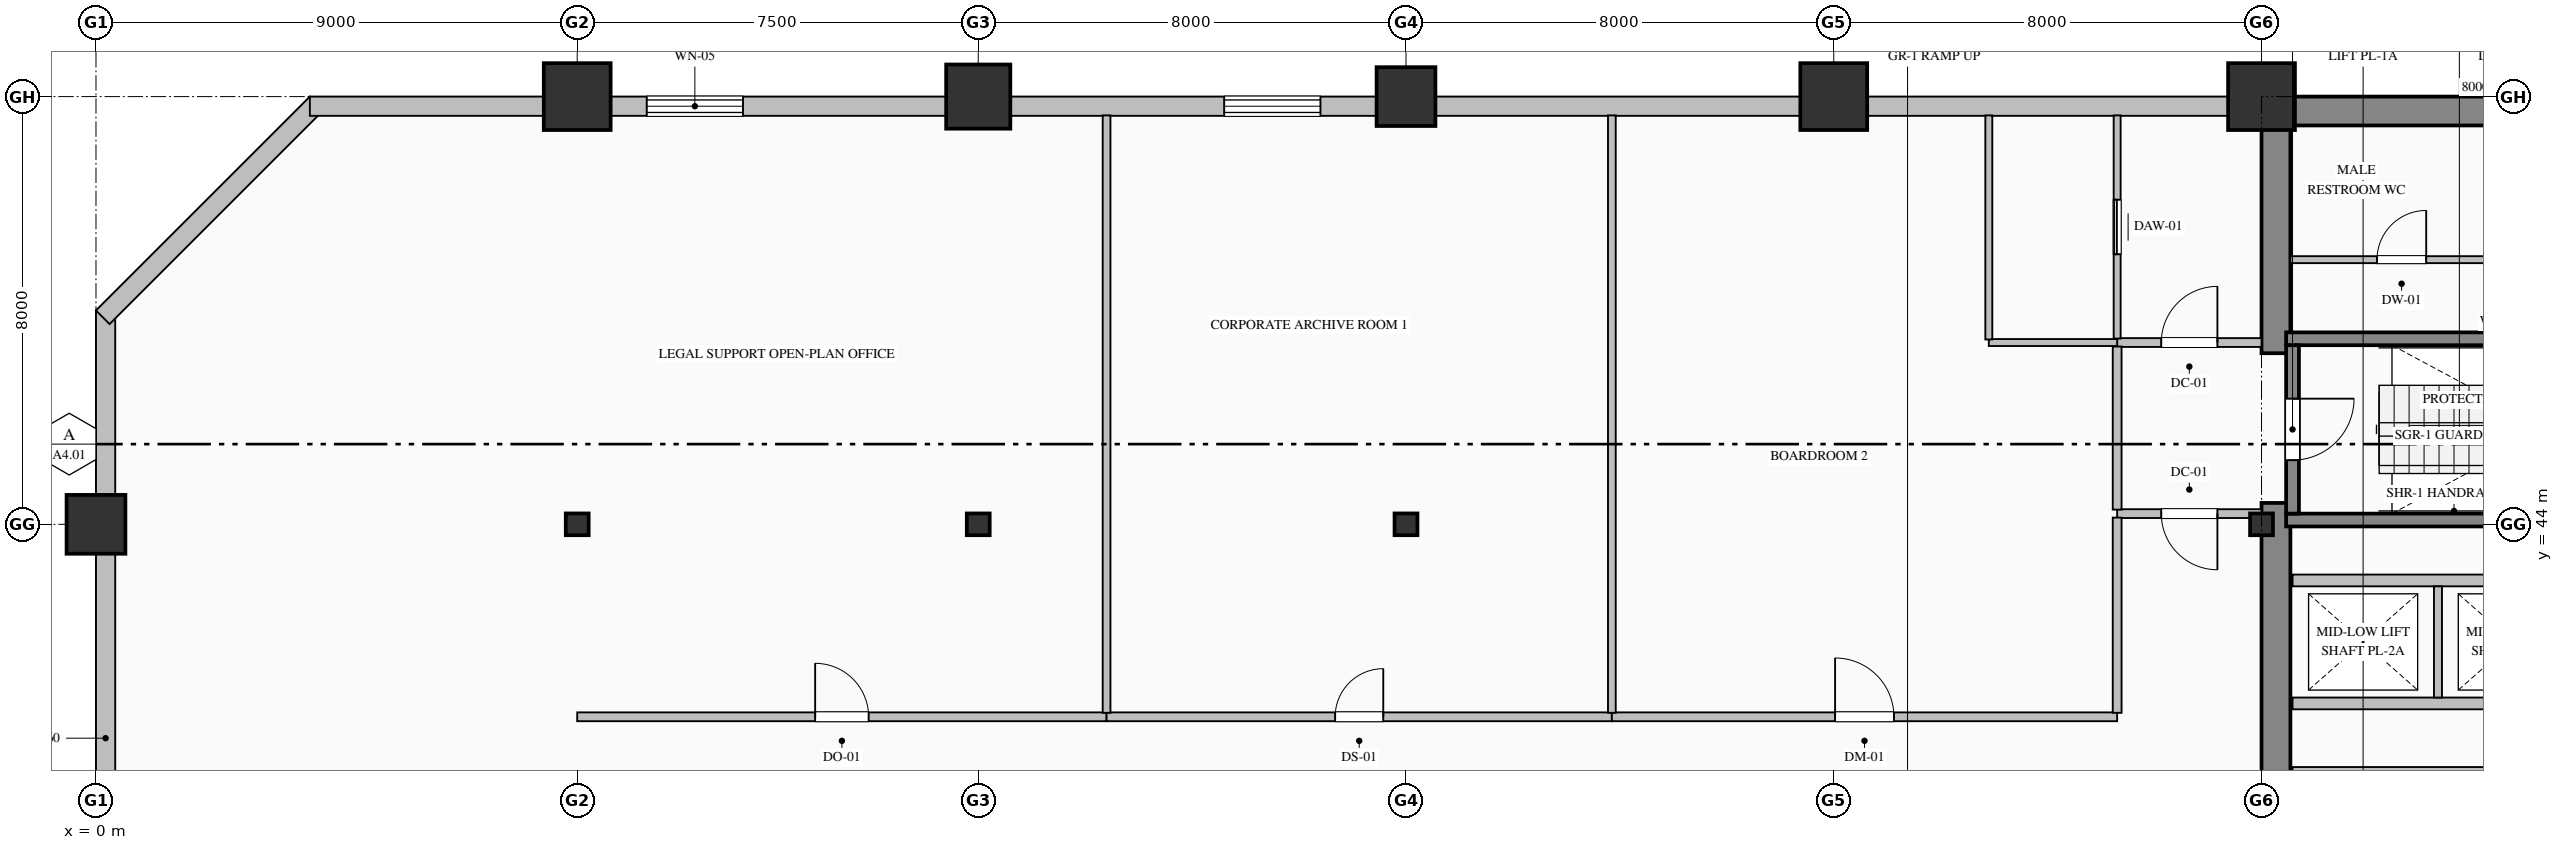
"""IFC4 building model, lengths in metres.
Left out: names, types, materials, properties, quantities, classifications, styles, units other than length and angle.
Written with IfcOpenShell. Run it as: python <this file> out.ifc"""

import sys

from ifc_helpers import new_model, si_unit, direction, frame, frame_2d, origin, origin_2d, place, context, subcontext, project, spatial, rectangle, hollow_rectangle, hollow_circle, i_section, extrude, element, fill, save


model = new_model("IFC4")
c1 = context("Model", 3, precision=1e-05, world=origin(), true_north=direction((0.0, 1.0)))
c2 = subcontext(c1, "Body", "Model", "MODEL_VIEW")
j1 = project(units=[si_unit("LENGTHUNIT", "METRE"), si_unit("PLANEANGLEUNIT", "RADIAN")], contexts=[c1])
p1 = place(None, origin())
s1 = spatial("IfcSite", under=j1, at=p1, CompositionType="ELEMENT")
p2 = place(p1, origin())
s2 = spatial("IfcBuilding", under=s1, at=p2, CompositionType="ELEMENT")
p3 = place(p2, frame((0.0, 0.0, 100.2)))
s3 = spatial("IfcBuildingStorey", under=s2, at=p3, CompositionType="ELEMENT", Elevation=100.2)
p4 = place(p3, frame((40.5, 51.73, 0.0), z_axis=(0.0, 0.0, 1.0), x_axis=(1.0, 0.0, 0.0)))
e1 = element("IfcWall", 1, at=p4, inside=s3, PredefinedType="SHEAR", context=c2, shape_type="SweptSolid", body=[
    extrude(rectangle(XDim=23.5, YDim=0.54, at=frame_2d((11.75, 0.0))), origin(), (0.0, 0.0, 1.0), 3.75),
])
p5 = place(p3, frame((40.77, 36.54, 0.0), z_axis=(0.0, 0.0, 1.0), x_axis=(0.0, 1.0, 0.0)))
e2 = element("IfcWall", 2, at=p5, inside=s3, PredefinedType="SHEAR", context=c2, shape_type="SweptSolid", body=[
    extrude(rectangle(XDim=7.86, YDim=0.54, at=frame_2d((3.93, 0.0))), origin(), (0.0, 0.0, 1.0), 3.75),
])
p6 = place(p3, frame((40.77, 47.2, 0.0), z_axis=(0.0, 0.0, 1.0), x_axis=(0.0, 1.0, 0.0)))
e3 = element("IfcWall", 3, at=p6, inside=s3, PredefinedType="SHEAR", context=c2, shape_type="SweptSolid", body=[
    extrude(rectangle(XDim=4.26, YDim=0.54, at=frame_2d((2.13, 0.0))), origin(), (0.0, 0.0, 1.0), 3.75),
])
p7 = place(p3, frame((0.0, 44.0, 0.0), z_axis=(0.0, 0.0, 1.0), x_axis=(1.0, 0.0, 0.0)))
e4 = element("IfcColumn", 4, at=p7, inside=s3, PredefinedType="COLUMN", context=c2, shape_type="SweptSolid", body=[
    extrude(hollow_rectangle(XDim=1.1, YDim=1.1, WallThickness=0.04, at=origin_2d()), origin(), (0.0, 0.0, 1.0), 4.0),
])
p8 = place(p3, frame((9.0, 44.0, 0.0), z_axis=(0.0, 0.0, 1.0), x_axis=(1.0, 0.0, 0.0)))
e5 = element("IfcColumn", 5, at=p8, inside=s3, PredefinedType="COLUMN", context=c2, shape_type="SweptSolid", body=[
    extrude(i_section(OverallWidth=0.407, OverallDepth=0.428, WebThickness=0.02, FlangeThickness=0.035, FilletRadius=0.022, at=origin_2d()), origin(), (0.0, 0.0, 1.0), 4.0),
])
p9 = place(p3, frame((9.0, 52.0, 0.0), z_axis=(0.0, 0.0, 1.0), x_axis=(1.0, 0.0, 0.0)))
e6 = element("IfcColumn", 6, at=p9, inside=s3, PredefinedType="COLUMN", context=c2, shape_type="SweptSolid", body=[
    extrude(hollow_rectangle(XDim=1.25, YDim=1.25, WallThickness=0.045, at=origin_2d()), origin(), (0.0, 0.0, 1.0), 4.0),
])
p10 = place(p3, frame((16.5, 44.0, 0.0), z_axis=(0.0, 0.0, 1.0), x_axis=(1.0, 0.0, 0.0)))
e7 = element("IfcColumn", 7, at=p10, inside=s3, PredefinedType="COLUMN", context=c2, shape_type="SweptSolid", body=[
    extrude(i_section(OverallWidth=0.407, OverallDepth=0.428, WebThickness=0.02, FlangeThickness=0.035, FilletRadius=0.022, at=origin_2d()), origin(), (0.0, 0.0, 1.0), 4.0),
])
p11 = place(p3, frame((16.5, 52.0, 0.0), z_axis=(0.0, 0.0, 1.0), x_axis=(1.0, 0.0, 0.0)))
e8 = element("IfcColumn", 8, at=p11, inside=s3, PredefinedType="COLUMN", context=c2, shape_type="SweptSolid", body=[
    extrude(hollow_circle(Radius=0.6, WallThickness=0.04, at=origin_2d()), origin(), (0.0, 0.0, 1.0), 4.0),
])
p12 = place(p3, frame((24.5, 44.0, 0.0), z_axis=(0.0, 0.0, 1.0), x_axis=(1.0, 0.0, 0.0)))
e9 = element("IfcColumn", 9, at=p12, inside=s3, PredefinedType="COLUMN", context=c2, shape_type="SweptSolid", body=[
    extrude(i_section(OverallWidth=0.407, OverallDepth=0.428, WebThickness=0.02, FlangeThickness=0.035, FilletRadius=0.022, at=origin_2d()), origin(), (0.0, 0.0, 1.0), 4.0),
])
p13 = place(p3, frame((24.5, 52.0, 0.0), z_axis=(0.0, 0.0, 1.0), x_axis=(1.0, 0.0, 0.0)))
e10 = element("IfcColumn", 10, at=p13, inside=s3, PredefinedType="COLUMN", context=c2, shape_type="SweptSolid", body=[
    extrude(hollow_rectangle(XDim=1.1, YDim=1.1, WallThickness=0.04, at=origin_2d()), origin(), (0.0, 0.0, 1.0), 4.0),
])
p14 = place(p3, frame((32.5, 52.0, 0.0), z_axis=(0.0, 0.0, 1.0), x_axis=(1.0, 0.0, 0.0)))
e11 = element("IfcColumn", 11, at=p14, inside=s3, PredefinedType="COLUMN", context=c2, shape_type="SweptSolid", body=[
    extrude(hollow_rectangle(XDim=1.25, YDim=1.25, WallThickness=0.045, at=origin_2d()), origin(), (0.0, 0.0, 1.0), 4.0),
])
p15 = place(p3, frame((40.5, 44.0, 0.0), z_axis=(0.0, 0.0, 1.0), x_axis=(1.0, 0.0, 0.0)))
e12 = element("IfcColumn", 12, at=p15, inside=s3, PredefinedType="COLUMN", context=c2, shape_type="SweptSolid", body=[
    extrude(i_section(OverallWidth=0.407, OverallDepth=0.428, WebThickness=0.02, FlangeThickness=0.035, FilletRadius=0.022, at=origin_2d()), origin(), (0.0, 0.0, 1.0), 4.0),
])
p16 = place(p3, frame((40.5, 52.0, 0.0), z_axis=(0.0, 0.0, 1.0), x_axis=(1.0, 0.0, 0.0)))
e13 = element("IfcColumn", 13, at=p16, inside=s3, PredefinedType="COLUMN", context=c2, shape_type="SweptSolid", body=[
    extrude(hollow_rectangle(XDim=1.25, YDim=1.25, WallThickness=0.045, at=origin_2d()), origin(), (0.0, 0.0, 1.0), 4.0),
])
p17 = place(p3, frame((0.18, 32.0, 0.0), z_axis=(0.0, 0.0, 1.0), x_axis=(0.0, 1.0, 0.0)))
e14 = element("IfcWall", 14, at=p17, inside=s3, PredefinedType="SOLIDWALL", context=c2, shape_type="SweptSolid", body=[
    extrude(rectangle(XDim=16.0, YDim=0.36, at=frame_2d((8.0, 0.0))), origin(), (0.0, 0.0, 1.0), 3.25),
])
p18 = place(p3, frame((0.127, 47.873, 0.0), z_axis=(0.0, 0.0, 1.0), x_axis=(0.707106781187, 0.707106781187, 0.0)))
e15 = element("IfcWall", 15, at=p18, inside=s3, PredefinedType="SOLIDWALL", context=c2, shape_type="SweptSolid", body=[
    extrude(rectangle(XDim=5.657, YDim=0.36, at=frame_2d((2.828, 0.0))), origin(), (0.0, 0.0, 1.0), 3.75),
])
p19 = place(p3, frame((4.0, 51.82, 0.0), z_axis=(0.0, 0.0, 1.0), x_axis=(1.0, 0.0, 0.0)))
e16 = element("IfcWall", 16, at=p19, inside=s3, PredefinedType="SOLIDWALL", context=c2, shape_type="SweptSolid", body=[
    extrude(rectangle(XDim=36.52, YDim=0.36, at=frame_2d((18.26, 0.0))), origin(), (0.0, 0.0, 1.0), 3.25),
])
p20 = place(p19, frame((6.3, 0.0, 0.85)))
e17 = element("IfcOpeningElement", 17, at=p20, cuts=e16, PredefinedType="OPENING", context=c2, shape_type="SweptSolid", body=[
    extrude(rectangle(XDim=1.8, YDim=2.05, at=frame_2d((0.9, 1.025))), frame((0.0, 0.19, 0.0), z_axis=(0.0, -1.0, 0.0), x_axis=(1.0, 0.0, 0.0)), (0.0, 0.0, 1.0), 0.38),
])
p21 = place(p19, frame((17.1, 0.0, 0.85)))
e18 = element("IfcOpeningElement", 18, at=p21, cuts=e16, PredefinedType="OPENING", context=c2, shape_type="SweptSolid", body=[
    extrude(rectangle(XDim=1.8, YDim=2.05, at=frame_2d((0.9, 1.025))), frame((0.0, 0.19, 0.0), z_axis=(0.0, -1.0, 0.0), x_axis=(1.0, 0.0, 0.0)), (0.0, 0.0, 1.0), 0.38),
])
for number, where, z_axis, x_axis in (
    (19, (40.96, 47.47, 0.0), (0.0, 0.0, 1.0), (1.0, 0.0, 0.0)),
    (20, (49.04, 44.08, 0.0), (0.0, 0.0, 1.0), (-1.0, 0.0, 0.0)),
):
    element("IfcWall", number, at=place(p3, frame(where, z_axis=z_axis, x_axis=x_axis)), inside=s3, PredefinedType="SOLIDWALL", context=c2, shape_type="SweptSolid", body=[
        extrude(rectangle(XDim=8.08, YDim=0.24, at=frame_2d((4.04, 0.0))), origin(), (0.0, 0.0, 1.0), 4.0),
    ])
p22 = place(p3, frame((41.08, 47.35, 0.0), z_axis=(0.0, 0.0, 1.0), x_axis=(0.0, -1.0, 0.0)))
e21 = element("IfcWall", 21, at=p22, inside=s3, PredefinedType="SOLIDWALL", context=c2, shape_type="SweptSolid", body=[
    extrude(rectangle(XDim=3.15, YDim=0.24, at=frame_2d((1.575, 0.0))), origin(), (0.0, 0.0, 1.0), 4.0),
])
p23 = place(p22, frame((1.0, 0.0, 0.0)))
e22 = element("IfcOpeningElement", 22, at=p23, cuts=e21, PredefinedType="OPENING", context=c2, shape_type="SweptSolid", body=[
    extrude(rectangle(XDim=1.15, YDim=2.2, at=frame_2d((0.575, 1.1))), frame((0.0, 0.13, 0.0), z_axis=(0.0, -1.0, 0.0), x_axis=(1.0, 0.0, 0.0)), (0.0, 0.0, 1.0), 0.26),
])
for number, where, z_axis, x_axis in (
    (23, (41.08, 39.35, 0.0), (0.0, 0.0, 1.0), (1.0, 0.0, 0.0)),
    (24, (49.32, 40.65, 0.0), (0.0, 0.0, 1.0), (-1.0, 0.0, 0.0)),
    (25, (41.08, 42.95, 0.0), (0.0, 0.0, 1.0), (1.0, 0.0, 0.0)),
):
    element("IfcWall", number, at=place(p3, frame(where, z_axis=z_axis, x_axis=x_axis)), inside=s3, PredefinedType="PARTITIONING", context=c2, shape_type="SweptSolid", body=[
        extrude(rectangle(XDim=8.24, YDim=0.22, at=frame_2d((4.12, 0.0))), origin(), (0.0, 0.0, 1.0), 3.75),
    ])
p24 = place(p3, frame((43.8, 40.76, 0.0), z_axis=(0.0, 0.0, 1.0), x_axis=(0.0, 1.0, 0.0)))
e26 = element("IfcWall", 26, at=p24, inside=s3, PredefinedType="PARTITIONING", context=c2, shape_type="SweptSolid", body=[
    extrude(rectangle(XDim=2.08, YDim=0.15, at=frame_2d((1.04, 0.0))), origin(), (0.0, 0.0, 1.0), 3.75),
])
p25 = place(p3, frame((37.8, 47.4, 0.0), z_axis=(0.0, 0.0, 1.0), x_axis=(1.0, 0.0, 0.0)))
e27 = element("IfcWall", 27, at=p25, inside=s3, PredefinedType="PARTITIONING", context=c2, shape_type="SweptSolid", body=[
    extrude(rectangle(XDim=2.7, YDim=0.165, at=frame_2d((1.35, 0.0))), origin(), (0.0, 0.0, 1.0), 3.75),
])
p26 = place(p25, frame((0.825, 0.0, 0.0)))
e28 = element("IfcOpeningElement", 28, at=p26, cuts=e27, PredefinedType="OPENING", context=c2, shape_type="SweptSolid", body=[
    extrude(rectangle(XDim=1.05, YDim=2.15, at=frame_2d((0.525, 1.075))), frame((0.0, 0.093, 0.0), z_axis=(0.0, -1.0, 0.0), x_axis=(1.0, 0.0, 0.0)), (0.0, 0.0, 1.0), 0.185),
])
p27 = place(p3, frame((40.5, 44.2, 0.0), z_axis=(0.0, 0.0, 1.0), x_axis=(-1.0, 0.0, 0.0)))
e29 = element("IfcWall", 29, at=p27, inside=s3, PredefinedType="PARTITIONING", context=c2, shape_type="SweptSolid", body=[
    extrude(rectangle(XDim=2.7, YDim=0.165, at=frame_2d((1.35, 0.0))), origin(), (0.0, 0.0, 1.0), 3.75),
])
p28 = place(p27, frame((0.825, 0.0, 0.0)))
e30 = element("IfcOpeningElement", 30, at=p28, cuts=e29, PredefinedType="OPENING", context=c2, shape_type="SweptSolid", body=[
    extrude(rectangle(XDim=1.05, YDim=2.15, at=frame_2d((0.525, 1.075))), frame((0.0, 0.093, 0.0), z_axis=(0.0, -1.0, 0.0), x_axis=(1.0, 0.0, 0.0)), (0.0, 0.0, 1.0), 0.185),
])
p29 = place(p3, frame((37.8, 44.274, 0.0), z_axis=(0.0, 0.0, 1.0), x_axis=(0.0, 1.0, 0.0)))
e31 = element("IfcWall", 31, at=p29, inside=s3, PredefinedType="PARTITIONING", context=c2, shape_type="SweptSolid", body=[
    extrude(rectangle(XDim=3.051, YDim=0.165, at=frame_2d((1.525, 0.0))), origin(), (0.0, 0.0, 1.0), 3.75),
])
p30 = place(p3, frame((37.8, 47.475, 0.0), z_axis=(0.0, 0.0, 1.0), x_axis=(0.0, 1.0, 0.0)))
e32 = element("IfcWall", 32, at=p30, inside=s3, PredefinedType="PARTITIONING", context=c2, shape_type="SweptSolid", body=[
    extrude(rectangle(XDim=4.173, YDim=0.13, at=frame_2d((2.087, 0.0))), origin(), (0.0, 0.0, 1.0), 3.75),
])
p31 = place(p30, frame((1.577, 0.0, 0.0)))
e33 = element("IfcOpeningElement", 33, at=p31, cuts=e32, PredefinedType="OPENING", context=c2, shape_type="SweptSolid", body=[
    extrude(rectangle(XDim=1.02, YDim=2.15, at=frame_2d((0.51, 1.075))), frame((0.0, 0.075, 0.0), z_axis=(0.0, -1.0, 0.0), x_axis=(1.0, 0.0, 0.0)), (0.0, 0.0, 1.0), 0.15),
])
p32 = place(p3, frame((37.8, 47.4, 0.0), z_axis=(0.0, 0.0, 1.0), x_axis=(-1.0, 0.0, 0.0)))
e34 = element("IfcWall", 34, at=p32, inside=s3, PredefinedType="PARTITIONING", context=c2, shape_type="SweptSolid", body=[
    extrude(rectangle(XDim=2.4, YDim=0.13, at=frame_2d((1.2, 0.0))), origin(), (0.0, 0.0, 1.0), 3.75),
])
p33 = place(p3, frame((35.4, 47.457, 0.0), z_axis=(0.0, 0.0, 1.0), x_axis=(0.0, 1.0, 0.0)))
e35 = element("IfcWall", 35, at=p33, inside=s3, PredefinedType="PARTITIONING", context=c2, shape_type="SweptSolid", body=[
    extrude(rectangle(XDim=4.191, YDim=0.13, at=frame_2d((2.095, 0.0))), origin(), (0.0, 0.0, 1.0), 3.75),
])
p34 = place(p3, frame((41.04, 48.95, 0.0), z_axis=(0.0, 0.0, 1.0), x_axis=(1.0, 0.0, 0.0)))
e36 = element("IfcWall", 36, at=p34, inside=s3, PredefinedType="PARTITIONING", context=c2, shape_type="SweptSolid", body=[
    extrude(rectangle(XDim=4.16, YDim=0.13, at=frame_2d((2.08, 0.0))), origin(), (0.0, 0.0, 1.0), 3.75),
])
p35 = place(p34, frame((1.62, 0.0, 0.0)))
e37 = element("IfcOpeningElement", 37, at=p35, cuts=e36, PredefinedType="OPENING", context=c2, shape_type="SweptSolid", body=[
    extrude(rectangle(XDim=0.92, YDim=2.15, at=frame_2d((0.46, 1.075))), frame((0.0, 0.075, 0.0), z_axis=(0.0, -1.0, 0.0), x_axis=(1.0, 0.0, 0.0)), (0.0, 0.0, 1.0), 0.15),
])
p36 = place(p3, frame((9.0, 40.4, 0.0), z_axis=(0.0, 0.0, 1.0), x_axis=(1.0, 0.0, 0.0)))
e38 = element("IfcWall", 38, at=p36, inside=s3, PredefinedType="PARTITIONING", context=c2, shape_type="SweptSolid", body=[
    extrude(rectangle(XDim=9.9, YDim=0.165, at=frame_2d((4.95, 0.0))), origin(), (0.0, 0.0, 1.0), 3.75),
])
p37 = place(p36, frame((4.45, 0.0, 0.0)))
e39 = element("IfcOpeningElement", 39, at=p37, cuts=e38, PredefinedType="OPENING", context=c2, shape_type="SweptSolid", body=[
    extrude(rectangle(XDim=1.0, YDim=2.15, at=frame_2d((0.5, 1.075))), frame((0.0, 0.093, 0.0), z_axis=(0.0, -1.0, 0.0), x_axis=(1.0, 0.0, 0.0)), (0.0, 0.0, 1.0), 0.185),
])
p38 = place(p3, frame((18.9, 40.4, 0.0), z_axis=(0.0, 0.0, 1.0), x_axis=(1.0, 0.0, 0.0)))
e40 = element("IfcWall", 40, at=p38, inside=s3, PredefinedType="PARTITIONING", context=c2, shape_type="SweptSolid", body=[
    extrude(rectangle(XDim=9.45, YDim=0.165, at=frame_2d((4.725, 0.0))), origin(), (0.0, 0.0, 1.0), 3.75),
])
p39 = place(p38, frame((4.275, 0.0, 0.0)))
e41 = element("IfcOpeningElement", 41, at=p39, cuts=e40, PredefinedType="OPENING", context=c2, shape_type="SweptSolid", body=[
    extrude(rectangle(XDim=0.9, YDim=2.15, at=frame_2d((0.45, 1.075))), frame((0.0, 0.093, 0.0), z_axis=(0.0, -1.0, 0.0), x_axis=(1.0, 0.0, 0.0)), (0.0, 0.0, 1.0), 0.185),
])
p40 = place(p3, frame((28.35, 40.4, 0.0), z_axis=(0.0, 0.0, 1.0), x_axis=(1.0, 0.0, 0.0)))
e42 = element("IfcWall", 42, at=p40, inside=s3, PredefinedType="PARTITIONING", context=c2, shape_type="SweptSolid", body=[
    extrude(rectangle(XDim=9.45, YDim=0.165, at=frame_2d((4.725, 0.0))), origin(), (0.0, 0.0, 1.0), 3.75),
])
p41 = place(p40, frame((4.175, 0.0, 0.0)))
e43 = element("IfcOpeningElement", 43, at=p41, cuts=e42, PredefinedType="OPENING", context=c2, shape_type="SweptSolid", body=[
    extrude(rectangle(XDim=1.1, YDim=2.2, at=frame_2d((0.55, 1.1))), frame((0.0, 0.093, 0.0), z_axis=(0.0, -1.0, 0.0), x_axis=(1.0, 0.0, 0.0)), (0.0, 0.0, 1.0), 0.185),
])
p42 = place(p3, frame((37.8, 40.475, 0.0), z_axis=(0.0, 0.0, 1.0), x_axis=(0.0, 1.0, 0.0)))
e44 = element("IfcWall", 44, at=p42, inside=s3, PredefinedType="PARTITIONING", context=c2, shape_type="SweptSolid", body=[
    extrude(rectangle(XDim=3.651, YDim=0.165, at=frame_2d((1.825, 0.0))), origin(), (0.0, 0.0, 1.0), 3.75),
])
for number, where, z_axis, x_axis in (
    (45, (18.9, 51.648, 0.0), (0.0, 0.0, 1.0), (0.0, -1.0, 0.0)),
    (46, (28.35, 51.648, 0.0), (0.0, 0.0, 1.0), (0.0, -1.0, 0.0)),
):
    element("IfcWall", number, at=place(p3, frame(where, z_axis=z_axis, x_axis=x_axis)), inside=s3, PredefinedType="PARTITIONING", context=c2, shape_type="SweptSolid", body=[
        extrude(rectangle(XDim=11.173, YDim=0.145, at=frame_2d((5.587, 0.0))), origin(), (0.0, 0.0, 1.0), 3.75),
    ])
p43 = place(p20, origin())
e47 = element("IfcWindow", 47, at=p43, inside=s3, PartitioningType="TRIPLE_PANEL_VERTICAL", PredefinedType="WINDOW", context=c2, shape_type="SweptSolid", body=[
    extrude(rectangle(XDim=1.8, YDim=2.05, at=frame_2d((0.9, 1.025))), frame((0.0, 0.15, 0.0), z_axis=(0.0, -1.0, 0.0), x_axis=(1.0, 0.0, 0.0)), (0.0, 0.0, 1.0), 0.06),
])
fill(e17, e47)
p44 = place(p21, origin())
e48 = element("IfcWindow", 48, at=p44, inside=s3, PartitioningType="TRIPLE_PANEL_VERTICAL", PredefinedType="WINDOW", context=c2, shape_type="SweptSolid", body=[
    extrude(rectangle(XDim=1.8, YDim=2.05, at=frame_2d((0.9, 1.025))), frame((0.0, 0.15, 0.0), z_axis=(0.0, -1.0, 0.0), x_axis=(1.0, 0.0, 0.0)), (0.0, 0.0, 1.0), 0.06),
])
fill(e18, e48)
p45 = place(p23, origin())
e49 = element("IfcDoor", 49, at=p45, inside=s3, OperationType="SINGLE_SWING_LEFT", PredefinedType="DOOR", context=c2, shape_type="SweptSolid", body=[
    extrude(rectangle(XDim=1.15, YDim=2.2, at=frame_2d((0.575, 1.1))), frame((0.0, 0.025, 0.0), z_axis=(0.0, -1.0, 0.0), x_axis=(1.0, 0.0, 0.0)), (0.0, 0.0, 1.0), 0.05),
])
fill(e22, e49)
p46 = place(p26, origin())
e50 = element("IfcDoor", 50, at=p46, inside=s3, OperationType="SINGLE_SWING_RIGHT", PredefinedType="DOOR", context=c2, shape_type="SweptSolid", body=[
    extrude(rectangle(XDim=1.05, YDim=2.15, at=frame_2d((0.525, 1.075))), frame((0.0, 0.025, 0.0), z_axis=(0.0, -1.0, 0.0), x_axis=(1.0, 0.0, 0.0)), (0.0, 0.0, 1.0), 0.05),
])
fill(e28, e50)
p47 = place(p28, origin())
e51 = element("IfcDoor", 51, at=p47, inside=s3, OperationType="SINGLE_SWING_LEFT", PredefinedType="DOOR", context=c2, shape_type="SweptSolid", body=[
    extrude(rectangle(XDim=1.05, YDim=2.15, at=frame_2d((0.525, 1.075))), frame((0.0, 0.025, 0.0), z_axis=(0.0, -1.0, 0.0), x_axis=(1.0, 0.0, 0.0)), (0.0, 0.0, 1.0), 0.05),
])
fill(e30, e51)
p48 = place(p31, origin())
e52 = element("IfcDoor", 52, at=p48, inside=s3, OperationType="SLIDING_TO_LEFT", PredefinedType="DOOR", context=c2, shape_type="SweptSolid", body=[
    extrude(rectangle(XDim=1.02, YDim=2.15, at=frame_2d((0.51, 1.075))), frame((0.0, 0.025, 0.0), z_axis=(0.0, -1.0, 0.0), x_axis=(1.0, 0.0, 0.0)), (0.0, 0.0, 1.0), 0.05),
])
fill(e33, e52)
p49 = place(p35, origin())
e53 = element("IfcDoor", 53, at=p49, inside=s3, OperationType="SINGLE_SWING_RIGHT", PredefinedType="DOOR", context=c2, shape_type="SweptSolid", body=[
    extrude(rectangle(XDim=0.92, YDim=2.15, at=frame_2d((0.46, 1.075))), frame((0.0, 0.025, 0.0), z_axis=(0.0, -1.0, 0.0), x_axis=(1.0, 0.0, 0.0)), (0.0, 0.0, 1.0), 0.05),
])
fill(e37, e53)
p50 = place(p37, origin())
e54 = element("IfcDoor", 54, at=p50, inside=s3, OperationType="SINGLE_SWING_LEFT", PredefinedType="DOOR", context=c2, shape_type="SweptSolid", body=[
    extrude(rectangle(XDim=1.0, YDim=2.15, at=frame_2d((0.5, 1.075))), frame((0.0, 0.025, 0.0), z_axis=(0.0, -1.0, 0.0), x_axis=(1.0, 0.0, 0.0)), (0.0, 0.0, 1.0), 0.05),
])
fill(e39, e54)
p51 = place(p39, origin())
e55 = element("IfcDoor", 55, at=p51, inside=s3, OperationType="SINGLE_SWING_RIGHT", PredefinedType="DOOR", context=c2, shape_type="SweptSolid", body=[
    extrude(rectangle(XDim=0.9, YDim=2.15, at=frame_2d((0.45, 1.075))), frame((0.0, 0.025, 0.0), z_axis=(0.0, -1.0, 0.0), x_axis=(1.0, 0.0, 0.0)), (0.0, 0.0, 1.0), 0.05),
])
fill(e41, e55)
p52 = place(p41, origin())
e56 = element("IfcDoor", 56, at=p52, inside=s3, OperationType="SINGLE_SWING_LEFT", PredefinedType="DOOR", context=c2, shape_type="SweptSolid", body=[
    extrude(rectangle(XDim=1.1, YDim=2.2, at=frame_2d((0.55, 1.1))), frame((0.0, 0.025, 0.0), z_axis=(0.0, -1.0, 0.0), x_axis=(1.0, 0.0, 0.0)), (0.0, 0.0, 1.0), 0.05),
])
fill(e43, e56)
save(model, sys.argv[1])
